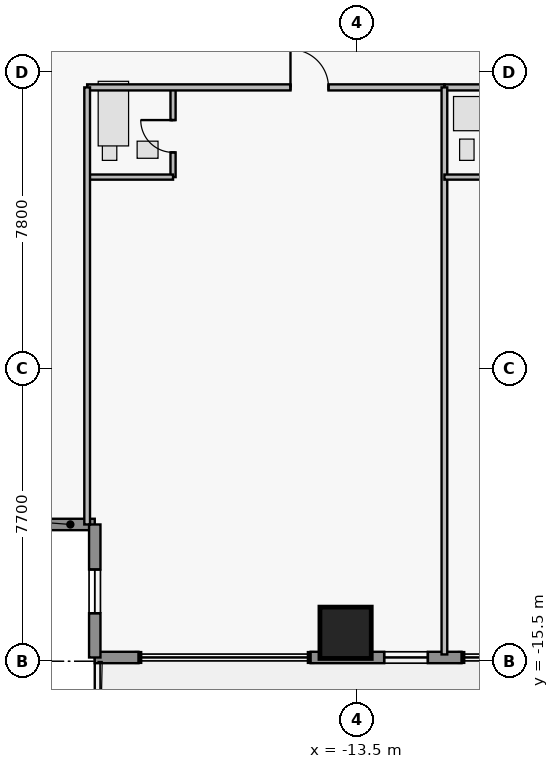
"""IFC4 building model, lengths in metres.
Left out: names, types, materials, properties, quantities, classifications, styles, units other than length and angle.
Written with IfcOpenShell. Run it as: python <this file> out.ifc"""

import sys

from ifc_helpers import new_model, si_unit, direction, frame, frame_2d, origin, origin_2d, place, context, subcontext, project, spatial, rectangle, extrude, element, fill, save


model = new_model("IFC4")
c1 = context("Model", 3, precision=1e-05, world=origin(), true_north=direction((0.0, 1.0)))
c2 = subcontext(c1, "Body", "Model", "MODEL_VIEW")
j1 = project(units=[si_unit("LENGTHUNIT", "METRE"), si_unit("PLANEANGLEUNIT", "RADIAN")], contexts=[c1])
p1 = place(None, origin())
s1 = spatial("IfcSite", under=j1, at=p1, CompositionType="ELEMENT")
p2 = place(p1, origin())
s2 = spatial("IfcBuilding", under=s1, at=p2, CompositionType="ELEMENT")
p3 = place(p2, frame((0.0, 0.0, 99.3)))
s3 = spatial("IfcBuildingStorey", under=s2, at=p3, CompositionType="ELEMENT", Elevation=99.3)
p4 = place(p3, frame((-13.8, -14.75, 0.0), z_axis=(0.0, 0.0, 1.0), x_axis=(1.0, 0.0, 0.0)))
e1 = element("IfcColumn", 1, at=p4, inside=s3, PredefinedType="COLUMN", context=c2, shape_type="SweptSolid", body=[
    extrude(rectangle(XDim=1.35, YDim=1.35, at=origin_2d()), origin(), (0.0, 0.0, 1.0), 3.65),
])
p5 = place(p3, frame((-20.4, -11.9, 0.0), z_axis=(0.0, 0.0, 1.0), x_axis=(-1.0, 0.0, 0.0)))
e2 = element("IfcWall", 2, at=p5, inside=s3, PredefinedType="STANDARD", context=c2, shape_type="SweptSolid", body=[
    extrude(rectangle(XDim=3.5, YDim=0.3, at=frame_2d((1.75, 0.0))), origin(), (0.0, 0.0, 1.0), 3.43),
])
p6 = place(p5, frame((1.285, 0.0, 1.25)))
e3 = element("IfcOpeningElement", 3, at=p6, cuts=e2, PredefinedType="OPENING", context=c2, shape_type="SweptSolid", body=[
    extrude(rectangle(XDim=1.15, YDim=1.55, at=frame_2d((0.575, 0.775))), frame((0.0, 0.16, 0.0), z_axis=(0.0, -1.0, 0.0), x_axis=(1.0, 0.0, 0.0)), (0.0, 0.0, 1.0), 0.32),
])
p7 = place(p3, frame((-10.75, -15.4, 0.0), z_axis=(0.0, 0.0, 1.0), x_axis=(-1.0, 0.0, 0.0)))
e4 = element("IfcWall", 4, at=p7, inside=s3, PredefinedType="STANDARD", context=c2, shape_type="SweptSolid", body=[
    extrude(rectangle(XDim=3.97, YDim=0.3, at=frame_2d((1.985, 0.0))), origin(), (0.0, 0.0, 1.0), 3.43),
])
p8 = place(p7, frame((0.885, 0.0, 0.95)))
e5 = element("IfcOpeningElement", 5, at=p8, cuts=e4, PredefinedType="OPENING", context=c2, shape_type="SweptSolid", body=[
    extrude(rectangle(XDim=1.15, YDim=1.55, at=frame_2d((0.575, 0.775))), frame((0.0, 0.16, 0.0), z_axis=(0.0, -1.0, 0.0), x_axis=(1.0, 0.0, 0.0)), (0.0, 0.0, 1.0), 0.32),
])
p9 = place(p3, frame((-19.25, -15.4, 0.0), z_axis=(0.0, 0.0, 1.0), x_axis=(-1.0, 0.0, 0.0)))
e6 = element("IfcWall", 6, at=p9, inside=s3, PredefinedType="STANDARD", context=c2, shape_type="SweptSolid", body=[
    extrude(rectangle(XDim=1.15, YDim=0.3, at=frame_2d((0.575, 0.0))), origin(), (0.0, 0.0, 1.0), 3.43),
])
p10 = place(p3, frame((-20.4, -15.4, 0.0), z_axis=(0.0, 0.0, 1.0), x_axis=(0.0, 1.0, 0.0)))
e7 = element("IfcWall", 7, at=p10, inside=s3, PredefinedType="STANDARD", context=c2, shape_type="SweptSolid", body=[
    extrude(rectangle(XDim=3.5, YDim=0.3, at=frame_2d((1.75, 0.0))), origin(), (0.0, 0.0, 1.0), 3.43),
])
p11 = place(p10, frame((1.165, 0.0, 1.25)))
e8 = element("IfcOpeningElement", 8, at=p11, cuts=e7, PredefinedType="OPENING", context=c2, shape_type="SweptSolid", body=[
    extrude(rectangle(XDim=1.15, YDim=1.55, at=frame_2d((0.575, 0.775))), frame((0.0, 0.16, 0.0), z_axis=(0.0, -1.0, 0.0), x_axis=(1.0, 0.0, 0.0)), (0.0, 0.0, 1.0), 0.32),
])
p12 = place(p3, frame((-18.34, -2.76, 0.0), z_axis=(0.0, 0.0, 1.0), x_axis=(0.0, 1.0, 0.0)))
e9 = element("IfcWall", 9, at=p12, inside=s3, PredefinedType="PLUMBINGWALL", context=c2, shape_type="SweptSolid", body=[
    extrude(rectangle(XDim=2.36, YDim=0.135, at=frame_2d((1.18, 0.0))), origin(), (0.0, 0.0, 1.0), 3.43),
])
p13 = place(p12, frame((0.65, 0.0, 0.0)))
e10 = element("IfcOpeningElement", 10, at=p13, cuts=e9, PredefinedType="OPENING", context=c2, shape_type="SweptSolid", body=[
    extrude(rectangle(XDim=0.85, YDim=2.1, at=frame_2d((0.425, 1.05))), frame((0.0, 0.077, 0.0), z_axis=(0.0, -1.0, 0.0), x_axis=(1.0, 0.0, 0.0)), (0.0, 0.0, 1.0), 0.155),
])
p14 = place(p3, frame((-20.6, -0.4, 0.0), z_axis=(0.0, 0.0, 1.0), x_axis=(1.0, 0.0, 0.0)))
e11 = element("IfcWall", 11, at=p14, inside=s3, PredefinedType="PARTITIONING", context=c2, shape_type="SweptSolid", body=[
    extrude(rectangle(XDim=9.4, YDim=0.16, at=frame_2d((4.7, 0.0))), origin(), (0.0, 0.0, 1.0), 3.43),
])
p15 = place(p14, frame((5.35, 0.0, 0.0)))
e12 = element("IfcOpeningElement", 12, at=p15, cuts=e11, PredefinedType="OPENING", context=c2, shape_type="SweptSolid", body=[
    extrude(rectangle(XDim=1.0, YDim=2.15, at=frame_2d((0.5, 1.075))), frame((0.0, 0.09, 0.0), z_axis=(0.0, -1.0, 0.0), x_axis=(1.0, 0.0, 0.0)), (0.0, 0.0, 1.0), 0.18),
])
p16 = place(p3, frame((-11.2, -0.4, 0.0), z_axis=(0.0, 0.0, 1.0), x_axis=(1.0, 0.0, 0.0)))
e13 = element("IfcWall", 13, at=p16, inside=s3, PredefinedType="PARTITIONING", context=c2, shape_type="SweptSolid", body=[
    extrude(rectangle(XDim=7.4, YDim=0.16, at=frame_2d((3.7, 0.0))), origin(), (0.0, 0.0, 1.0), 3.43),
])
p17 = place(p16, frame((4.35, 0.0, 0.0)))
e14 = element("IfcOpeningElement", 14, at=p17, cuts=e13, PredefinedType="OPENING", context=c2, shape_type="SweptSolid", body=[
    extrude(rectangle(XDim=1.0, YDim=2.15, at=frame_2d((0.5, 1.075))), frame((0.0, 0.09, 0.0), z_axis=(0.0, -1.0, 0.0), x_axis=(1.0, 0.0, 0.0)), (0.0, 0.0, 1.0), 0.18),
])
p18 = place(p3, frame((-20.6, -2.76, 0.0), z_axis=(0.0, 0.0, 1.0), x_axis=(1.0, 0.0, 0.0)))
e15 = element("IfcWall", 15, at=p18, inside=s3, PredefinedType="PLUMBINGWALL", context=c2, shape_type="SweptSolid", body=[
    extrude(rectangle(XDim=2.26, YDim=0.135, at=frame_2d((1.13, 0.0))), origin(), (0.0, 0.0, 1.0), 3.43),
])
p19 = place(p3, frame((-20.6, -11.9, 0.0), z_axis=(0.0, 0.0, 1.0), x_axis=(0.0, 1.0, 0.0)))
e16 = element("IfcWall", 16, at=p19, inside=s3, PredefinedType="PARTITIONING", context=c2, shape_type="SweptSolid", body=[
    extrude(rectangle(XDim=11.5, YDim=0.15, at=frame_2d((5.75, 0.0))), origin(), (0.0, 0.0, 1.0), 3.43),
])
p20 = place(p3, frame((-11.2, -15.32, 0.0), z_axis=(0.0, 0.0, 1.0), x_axis=(0.0, 1.0, 0.0)))
e17 = element("IfcWall", 17, at=p20, inside=s3, PredefinedType="PARTITIONING", context=c2, shape_type="SweptSolid", body=[
    extrude(rectangle(XDim=14.92, YDim=0.15, at=frame_2d((7.46, 0.0))), origin(), (0.0, 0.0, 1.0), 3.43),
])
p21 = place(p3, frame((-11.2, -2.76, 0.0), z_axis=(0.0, 0.0, 1.0), x_axis=(1.0, 0.0, 0.0)))
e18 = element("IfcWall", 18, at=p21, inside=s3, PredefinedType="PLUMBINGWALL", context=c2, shape_type="SweptSolid", body=[
    extrude(rectangle(XDim=2.26, YDim=0.135, at=frame_2d((1.13, 0.0))), origin(), (0.0, 0.0, 1.0), 3.43),
])
p22 = place(p8, origin())
e19 = element("IfcWindow", 19, at=p22, inside=s3, PartitioningType="SINGLE_PANEL", PredefinedType="WINDOW", context=c2, shape_type="SweptSolid", body=[
    extrude(rectangle(XDim=1.15, YDim=1.55, at=frame_2d((0.575, 0.775))), frame((0.0, 0.03, 0.0), z_axis=(0.0, -1.0, 0.0), x_axis=(1.0, 0.0, 0.0)), (0.0, 0.0, 1.0), 0.06),
])
fill(e5, e19)
p23 = place(p11, origin())
e20 = element("IfcWindow", 20, at=p23, inside=s3, PartitioningType="SINGLE_PANEL", PredefinedType="WINDOW", context=c2, shape_type="SweptSolid", body=[
    extrude(rectangle(XDim=1.15, YDim=1.55, at=frame_2d((0.575, 0.775))), frame((0.0, 0.03, 0.0), z_axis=(0.0, -1.0, 0.0), x_axis=(1.0, 0.0, 0.0)), (0.0, 0.0, 1.0), 0.06),
])
fill(e8, e20)
p24 = place(p13, origin())
e21 = element("IfcDoor", 21, at=p24, inside=s3, OperationType="SINGLE_SWING_RIGHT", PredefinedType="DOOR", context=c2, shape_type="SweptSolid", body=[
    extrude(rectangle(XDim=0.85, YDim=2.1, at=frame_2d((0.425, 1.05))), frame((0.0, 0.025, 0.0), z_axis=(0.0, -1.0, 0.0), x_axis=(1.0, 0.0, 0.0)), (0.0, 0.0, 1.0), 0.05),
])
fill(e10, e21)
p25 = place(p15, origin())
e22 = element("IfcDoor", 22, at=p25, inside=s3, OperationType="SINGLE_SWING_LEFT", PredefinedType="DOOR", context=c2, shape_type="SweptSolid", body=[
    extrude(rectangle(XDim=1.0, YDim=2.15, at=frame_2d((0.5, 1.075))), frame((0.0, 0.025, 0.0), z_axis=(0.0, -1.0, 0.0), x_axis=(1.0, 0.0, 0.0)), (0.0, 0.0, 1.0), 0.05),
])
fill(e12, e22)
save(model, sys.argv[1])
